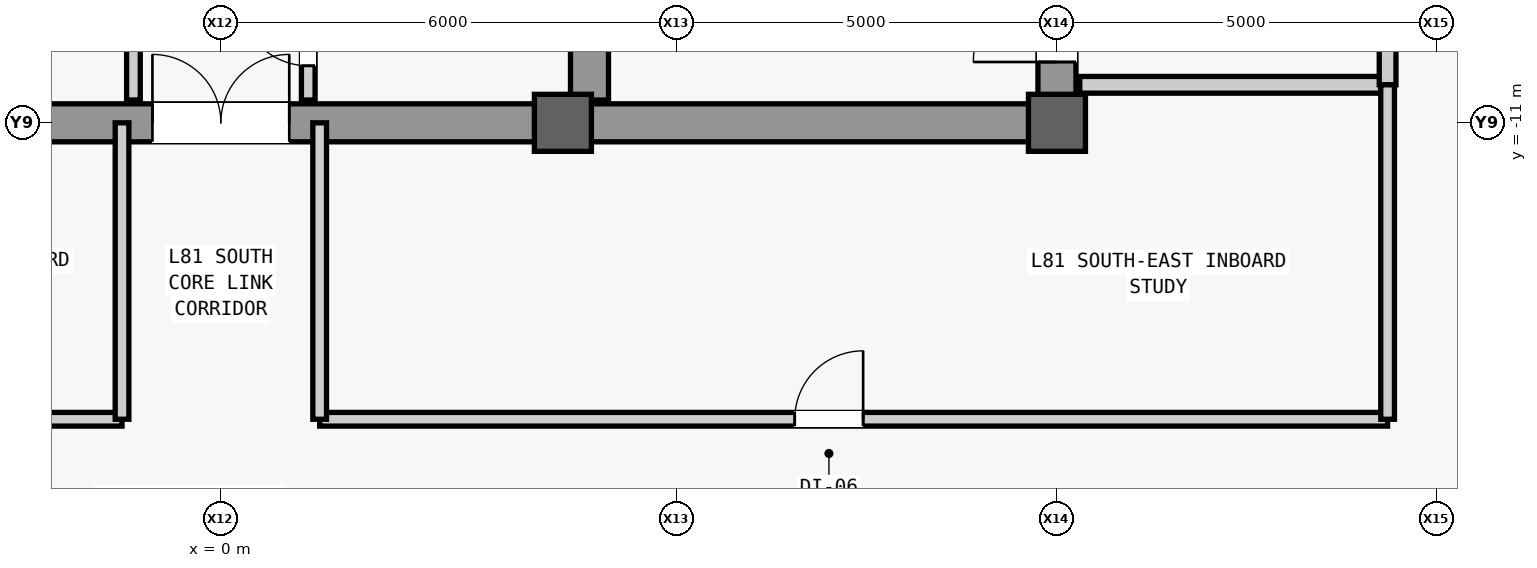
"""IFC4 building model, lengths in metres.
Left out: names, types, materials, properties, quantities, classifications, styles, units other than length and angle.
Written with IfcOpenShell. Run it as: python <this file> out.ifc"""

import sys

from ifc_helpers import new_model, si_unit, direction, frame, frame_2d, origin, origin_2d, place, context, subcontext, project, spatial, rectangle, extrude, source, transform, mapped, element, fill, save


model = new_model("IFC4")
c1 = context("Model", 3, precision=1e-05, world=origin(), true_north=direction((0.0, 1.0)))
c2 = subcontext(c1, "Body", "Model", "MODEL_VIEW")
j1 = project(units=[si_unit("LENGTHUNIT", "METRE"), si_unit("PLANEANGLEUNIT", "RADIAN")], contexts=[c1])
p1 = place(None, origin())
s1 = spatial("IfcSite", under=j1, at=p1, CompositionType="ELEMENT")
p2 = place(p1, origin())
s2 = spatial("IfcBuilding", under=s1, at=p2, CompositionType="ELEMENT")
p3 = place(p2, frame((0.0, 0.0, 342.3)))
s3 = spatial("IfcBuildingStorey", under=s2, at=p3, CompositionType="ELEMENT", Elevation=342.3)
m1 = source(origin(), c2, "Body", "SweptSolid", [
    extrude(rectangle(XDim=22.0, YDim=0.5, at=frame_2d((11.0, 0.0))), origin(), (0.0, 0.0, 1.0), 3.7),
])
p4 = place(p3, frame((11.0, -11.0, 0.0), z_axis=(0.0, 0.0, 1.0), x_axis=(0.0, 1.0, 0.0)))
e1 = element("IfcWall", 1, at=p4, inside=s3, PredefinedType="SHEAR", context=c2, shape_type="MappedRepresentation", body=[
    mapped(m1, transform((0.0, 0.0, 0.0), scale=1.0)),
])
m2 = source(origin(), c2, "Body", "SweptSolid", [
    extrude(rectangle(XDim=1.1, YDim=2.2, at=frame_2d((0.55, 1.1))), frame((0.0, 0.26, 0.0), z_axis=(0.0, -1.0, 0.0), x_axis=(1.0, 0.0, 0.0)), (0.0, 0.0, 1.0), 0.52),
])
p5 = place(p4, frame((0.8, 0.0, 0.0)))
e2 = element("IfcOpeningElement", 2, at=p5, cuts=e1, PredefinedType="OPENING", context=c2, shape_type="MappedRepresentation", body=[
    mapped(m2, transform((0.0, 0.0, 0.0), scale=1.0)),
])
m3 = source(origin(), c2, "Body", "SweptSolid", [
    extrude(rectangle(XDim=0.9, YDim=2.15, at=frame_2d((0.45, 1.075))), frame((0.0, 0.26, 0.0), z_axis=(0.0, -1.0, 0.0), x_axis=(1.0, 0.0, 0.0)), (0.0, 0.0, 1.0), 0.52),
])
p6 = place(p4, frame((6.85, 0.0, 0.0)))
e3 = element("IfcOpeningElement", 3, at=p6, cuts=e1, PredefinedType="OPENING", context=c2, shape_type="MappedRepresentation", body=[
    mapped(m3, transform((0.0, 0.0, 0.0), scale=1.0)),
])
m4 = source(origin(), c2, "Body", "SweptSolid", [
    extrude(rectangle(XDim=1.2, YDim=2.3, at=frame_2d((0.6, 1.15))), frame((0.0, 0.26, 0.0), z_axis=(0.0, -1.0, 0.0), x_axis=(1.0, 0.0, 0.0)), (0.0, 0.0, 1.0), 0.52),
])
p7 = place(p4, frame((17.6, 0.0, 0.0)))
e4 = element("IfcOpeningElement", 4, at=p7, cuts=e1, PredefinedType="OPENING", context=c2, shape_type="MappedRepresentation", body=[
    mapped(m4, transform((0.0, 0.0, 0.0), scale=1.0)),
])
p8 = place(p4, frame((19.6, 0.0, 0.0)))
e5 = element("IfcOpeningElement", 5, at=p8, cuts=e1, PredefinedType="OPENING", context=c2, shape_type="MappedRepresentation", body=[
    mapped(m4, transform((0.0, 0.0, 0.0), scale=1.0)),
])
m5 = source(origin(), c2, "Body", "SweptSolid", [
    extrude(rectangle(XDim=1.3, YDim=2.3, at=frame_2d((0.65, 1.15))), frame((0.0, 0.26, 0.0), z_axis=(0.0, -1.0, 0.0), x_axis=(1.0, 0.0, 0.0)), (0.0, 0.0, 1.0), 0.52),
])
p9 = place(p4, frame((2.7, 0.0, 0.0)))
e6 = element("IfcOpeningElement", 6, at=p9, cuts=e1, PredefinedType="OPENING", context=c2, shape_type="MappedRepresentation", body=[
    mapped(m5, transform((0.0, 0.0, 0.0), scale=1.0)),
])
p10 = place(p4, frame((13.35, 0.0, 0.0)))
e7 = element("IfcOpeningElement", 7, at=p10, cuts=e1, PredefinedType="OPENING", context=c2, shape_type="MappedRepresentation", body=[
    mapped(m5, transform((0.0, 0.0, 0.0), scale=1.0)),
])
m6 = source(origin(), c2, "Body", "SweptSolid", [
    extrude(rectangle(XDim=21.4, YDim=0.5, at=frame_2d((10.7, 0.0))), origin(), (0.0, 0.0, 1.0), 3.7),
])
p11 = place(p3, frame((4.85, -10.7, 0.0), z_axis=(0.0, 0.0, 1.0), x_axis=(0.0, 1.0, 0.0)))
e8 = element("IfcWall", 8, at=p11, inside=s3, PredefinedType="SHEAR", context=c2, shape_type="MappedRepresentation", body=[
    mapped(m6, transform((0.0, 0.0, 0.0), scale=1.0)),
])
m7 = source(origin(), c2, "Body", "SweptSolid", [
    extrude(rectangle(XDim=5.9, YDim=0.5, at=frame_2d((2.95, 0.0))), origin(), (0.0, 0.0, 1.0), 3.7),
])
p12 = place(p3, frame((4.85, -11.0, 0.0), z_axis=(0.0, 0.0, 1.0), x_axis=(1.0, 0.0, 0.0)))
e9 = element("IfcWall", 9, at=p12, inside=s3, PredefinedType="SHEAR", context=c2, shape_type="MappedRepresentation", body=[
    mapped(m7, transform((0.0, 0.0, 0.0), scale=1.0)),
])
m8 = source(origin(), c2, "Body", "SweptSolid", [
    extrude(rectangle(XDim=9.2, YDim=0.5, at=frame_2d((4.6, 0.0))), origin(), (0.0, 0.0, 1.0), 3.7),
])
p13 = place(p3, frame((-4.6, -11.0, 0.0), z_axis=(0.0, 0.0, 1.0), x_axis=(1.0, 0.0, 0.0)))
e10 = element("IfcWall", 10, at=p13, inside=s3, PredefinedType="SHEAR", context=c2, shape_type="MappedRepresentation", body=[
    mapped(m8, transform((0.0, 0.0, 0.0), scale=1.0)),
])
m9 = source(origin(), c2, "Body", "SweptSolid", [
    extrude(rectangle(XDim=1.8, YDim=2.25, at=frame_2d((0.9, 1.125))), frame((0.0, 0.26, 0.0), z_axis=(0.0, -1.0, 0.0), x_axis=(1.0, 0.0, 0.0)), (0.0, 0.0, 1.0), 0.52),
])
p14 = place(p13, frame((3.7, 0.0, 0.0)))
e11 = element("IfcOpeningElement", 11, at=p14, cuts=e10, PredefinedType="OPENING", context=c2, shape_type="MappedRepresentation", body=[
    mapped(m9, transform((0.0, 0.0, 0.0), scale=1.0)),
])
m10 = source(origin(), c2, "Body", "SweptSolid", [
    extrude(rectangle(XDim=0.75, YDim=0.75, at=origin_2d()), origin(), (0.0, 0.0, 1.0), 4.0),
])
for number, where, z_axis, x_axis in (
    (12, (4.5, -11.0, 0.0), (0.0, 0.0, 1.0), (1.0, 0.0, 0.0)),
    (13, (11.0, -11.0, 0.0), (0.0, 0.0, 1.0), (1.0, 0.0, 0.0)),
):
    element("IfcColumn", number, at=place(p3, frame(where, z_axis=z_axis, x_axis=x_axis)), inside=s3, PredefinedType="COLUMN", context=c2, shape_type="MappedRepresentation", body=[
        mapped(m10, transform((0.0, 0.0, 0.0), scale=1.0)),
    ])
m11 = source(origin(), c2, "Body", "SweptSolid", [
    extrude(rectangle(XDim=4.05, YDim=0.22, at=frame_2d((2.025, 0.0))), origin(), (0.0, 0.0, 1.0), 3.7),
])
p15 = place(p3, frame((11.3, -10.5, 0.0), z_axis=(0.0, 0.0, 1.0), x_axis=(1.0, 0.0, 0.0)))
e14 = element("IfcWall", 14, at=p15, inside=s3, PredefinedType="PARTITIONING", context=c2, shape_type="MappedRepresentation", body=[
    mapped(m11, transform((0.0, 0.0, 0.0), scale=1.0)),
])
m12 = source(origin(), c2, "Body", "SweptSolid", [
    extrude(rectangle(XDim=4.4, YDim=0.22, at=frame_2d((2.2, 0.0))), origin(), (0.0, 0.0, 1.0), 3.7),
])
p16 = place(p3, frame((15.35, -10.5, 0.0), z_axis=(0.0, 0.0, 1.0), x_axis=(0.0, 1.0, 0.0)))
e15 = element("IfcWall", 15, at=p16, inside=s3, PredefinedType="PARTITIONING", context=c2, shape_type="MappedRepresentation", body=[
    mapped(m12, transform((0.0, 0.0, 0.0), scale=1.0)),
])
m13 = source(origin(), c2, "Body", "SweptSolid", [
    extrude(rectangle(XDim=1.2, YDim=2.2, at=frame_2d((0.6, 1.1))), frame((0.0, 0.12, 0.0), z_axis=(0.0, -1.0, 0.0), x_axis=(1.0, 0.0, 0.0)), (0.0, 0.0, 1.0), 0.24),
])
p17 = place(p16, frame((1.6, 0.0, 0.0)))
e16 = element("IfcOpeningElement", 16, at=p17, cuts=e15, PredefinedType="OPENING", context=c2, shape_type="MappedRepresentation", body=[
    mapped(m13, transform((0.0, 0.0, 0.0), scale=1.0)),
])
m14 = source(origin(), c2, "Body", "SweptSolid", [
    extrude(rectangle(XDim=5.4, YDim=0.18, at=frame_2d((2.7, 0.0))), origin(), (0.0, 0.0, 1.0), 3.7),
])
p18 = place(p3, frame((-1.15, -10.7, 0.0), z_axis=(0.0, 0.0, 1.0), x_axis=(0.0, 1.0, 0.0)))
e17 = element("IfcWall", 17, at=p18, inside=s3, PredefinedType="PARTITIONING", context=c2, shape_type="MappedRepresentation", body=[
    mapped(m14, transform((0.0, 0.0, 0.0), scale=1.0)),
])
m15 = source(origin(), c2, "Body", "SweptSolid", [
    extrude(rectangle(XDim=0.9, YDim=2.15, at=frame_2d((0.45, 1.075))), frame((0.0, 0.1, 0.0), z_axis=(0.0, -1.0, 0.0), x_axis=(1.0, 0.0, 0.0)), (0.0, 0.0, 1.0), 0.2),
])
p19 = place(p18, frame((2.25, 0.0, 0.0)))
e18 = element("IfcOpeningElement", 18, at=p19, cuts=e17, PredefinedType="OPENING", context=c2, shape_type="MappedRepresentation", body=[
    mapped(m15, transform((0.0, 0.0, 0.0), scale=1.0)),
])
p20 = place(p3, frame((1.15, -10.7, 0.0), z_axis=(0.0, 0.0, 1.0), x_axis=(0.0, 1.0, 0.0)))
e19 = element("IfcWall", 19, at=p20, inside=s3, PredefinedType="PARTITIONING", context=c2, shape_type="MappedRepresentation", body=[
    mapped(m14, transform((0.0, 0.0, 0.0), scale=1.0)),
])
p21 = place(p20, frame((0.45, 0.0, 0.0)))
e20 = element("IfcOpeningElement", 20, at=p21, cuts=e19, PredefinedType="OPENING", context=c2, shape_type="MappedRepresentation", body=[
    mapped(m15, transform((0.0, 0.0, 0.0), scale=1.0)),
])
p22 = place(p20, frame((2.25, 0.0, 0.0)))
e21 = element("IfcOpeningElement", 21, at=p22, cuts=e19, PredefinedType="OPENING", context=c2, shape_type="MappedRepresentation", body=[
    mapped(m15, transform((0.0, 0.0, 0.0), scale=1.0)),
])
p23 = place(p20, frame((4.05, 0.0, 0.0)))
e22 = element("IfcOpeningElement", 22, at=p23, cuts=e19, PredefinedType="OPENING", context=c2, shape_type="MappedRepresentation", body=[
    mapped(m15, transform((0.0, 0.0, 0.0), scale=1.0)),
])
m16 = source(origin(), c2, "Body", "SweptSolid", [
    extrude(rectangle(XDim=16.1, YDim=0.18, at=frame_2d((8.05, 0.0))), origin(), (0.0, 0.0, 1.0), 3.7),
])
p24 = place(p3, frame((-17.4, -14.9, 0.0), z_axis=(0.0, 0.0, 1.0), x_axis=(1.0, 0.0, 0.0)))
e23 = element("IfcWall", 23, at=p24, inside=s3, PredefinedType="PARTITIONING", context=c2, shape_type="MappedRepresentation", body=[
    mapped(m16, transform((0.0, 0.0, 0.0), scale=1.0)),
])
p25 = place(p24, frame((8.95, 0.0, 0.0)))
e24 = element("IfcOpeningElement", 24, at=p25, cuts=e23, PredefinedType="OPENING", context=c2, shape_type="MappedRepresentation", body=[
    mapped(m15, transform((0.0, 0.0, 0.0), scale=1.0)),
])
m17 = source(origin(), c2, "Body", "SweptSolid", [
    extrude(rectangle(XDim=3.9, YDim=0.18, at=frame_2d((1.95, 0.0))), origin(), (0.0, 0.0, 1.0), 3.7),
])
p26 = place(p3, frame((-1.3, -14.9, 0.0), z_axis=(0.0, 0.0, 1.0), x_axis=(0.0, 1.0, 0.0)))
e25 = element("IfcWall", 25, at=p26, inside=s3, PredefinedType="PARTITIONING", context=c2, shape_type="MappedRepresentation", body=[
    mapped(m17, transform((0.0, 0.0, 0.0), scale=1.0)),
])
m18 = source(origin(), c2, "Body", "SweptSolid", [
    extrude(rectangle(XDim=14.05, YDim=0.18, at=frame_2d((7.025, 0.0))), origin(), (0.0, 0.0, 1.0), 3.7),
])
p27 = place(p3, frame((1.3, -14.9, 0.0), z_axis=(0.0, 0.0, 1.0), x_axis=(1.0, 0.0, 0.0)))
e26 = element("IfcWall", 26, at=p27, inside=s3, PredefinedType="PARTITIONING", context=c2, shape_type="MappedRepresentation", body=[
    mapped(m18, transform((0.0, 0.0, 0.0), scale=1.0)),
])
p28 = place(p27, frame((6.25, 0.0, 0.0)))
e27 = element("IfcOpeningElement", 27, at=p28, cuts=e26, PredefinedType="OPENING", context=c2, shape_type="MappedRepresentation", body=[
    mapped(m15, transform((0.0, 0.0, 0.0), scale=1.0)),
])
p29 = place(p3, frame((1.3, -14.9, 0.0), z_axis=(0.0, 0.0, 1.0), x_axis=(0.0, 1.0, 0.0)))
e28 = element("IfcWall", 28, at=p29, inside=s3, PredefinedType="PARTITIONING", context=c2, shape_type="MappedRepresentation", body=[
    mapped(m17, transform((0.0, 0.0, 0.0), scale=1.0)),
])
m19 = source(origin(), c2, "Body", "SweptSolid", [
    extrude(rectangle(XDim=4.4, YDim=0.18, at=frame_2d((2.2, 0.0))), origin(), (0.0, 0.0, 1.0), 3.7),
])
p30 = place(p3, frame((15.35, -14.9, 0.0), z_axis=(0.0, 0.0, 1.0), x_axis=(0.0, 1.0, 0.0)))
e29 = element("IfcWall", 29, at=p30, inside=s3, PredefinedType="PARTITIONING", context=c2, shape_type="MappedRepresentation", body=[
    mapped(m19, transform((0.0, 0.0, 0.0), scale=1.0)),
])
m20 = source(origin(), c2, "Body", "SweptSolid", [
    extrude(rectangle(XDim=1.1, YDim=2.2, at=frame_2d((0.55, 1.1))), frame((0.0, 0.025, 0.0), z_axis=(0.0, -1.0, 0.0), x_axis=(1.0, 0.0, 0.0)), (0.0, 0.0, 1.0), 0.05),
])
p31 = place(p5, origin())
e30 = element("IfcDoor", 30, at=p31, inside=s3, OperationType="SINGLE_SWING_LEFT", PredefinedType="DOOR", context=c2, shape_type="MappedRepresentation", body=[
    mapped(m20, transform((0.0, 0.0, 0.0), scale=1.0)),
])
fill(e2, e30)
m21 = source(origin(), c2, "Body", "SweptSolid", [
    extrude(rectangle(XDim=0.9, YDim=2.15, at=frame_2d((0.45, 1.075))), frame((0.0, 0.025, 0.0), z_axis=(0.0, -1.0, 0.0), x_axis=(1.0, 0.0, 0.0)), (0.0, 0.0, 1.0), 0.05),
])
p32 = place(p21, origin())
e31 = element("IfcDoor", 31, at=p32, inside=s3, OperationType="SINGLE_SWING_RIGHT", PredefinedType="DOOR", context=c2, shape_type="MappedRepresentation", body=[
    mapped(m21, transform((0.0, 0.0, 0.0), scale=1.0)),
])
fill(e20, e31)
m22 = source(origin(), c2, "Body", "SweptSolid", [
    extrude(rectangle(XDim=1.8, YDim=2.25, at=frame_2d((0.9, 1.125))), frame((0.0, 0.025, 0.0), z_axis=(0.0, -1.0, 0.0), x_axis=(1.0, 0.0, 0.0)), (0.0, 0.0, 1.0), 0.05),
])
p33 = place(p14, origin())
e32 = element("IfcDoor", 32, at=p33, inside=s3, OperationType="SINGLE_SWING_LEFT", PredefinedType="DOOR", context=c2, shape_type="MappedRepresentation", body=[
    mapped(m22, transform((0.0, 0.0, 0.0), scale=1.0)),
])
fill(e11, e32)
p34 = place(p28, origin())
e33 = element("IfcDoor", 33, at=p34, inside=s3, OperationType="SINGLE_SWING_RIGHT", PredefinedType="DOOR", context=c2, shape_type="MappedRepresentation", body=[
    mapped(m21, transform((0.0, 0.0, 0.0), scale=1.0)),
])
fill(e27, e33)
save(model, sys.argv[1])
